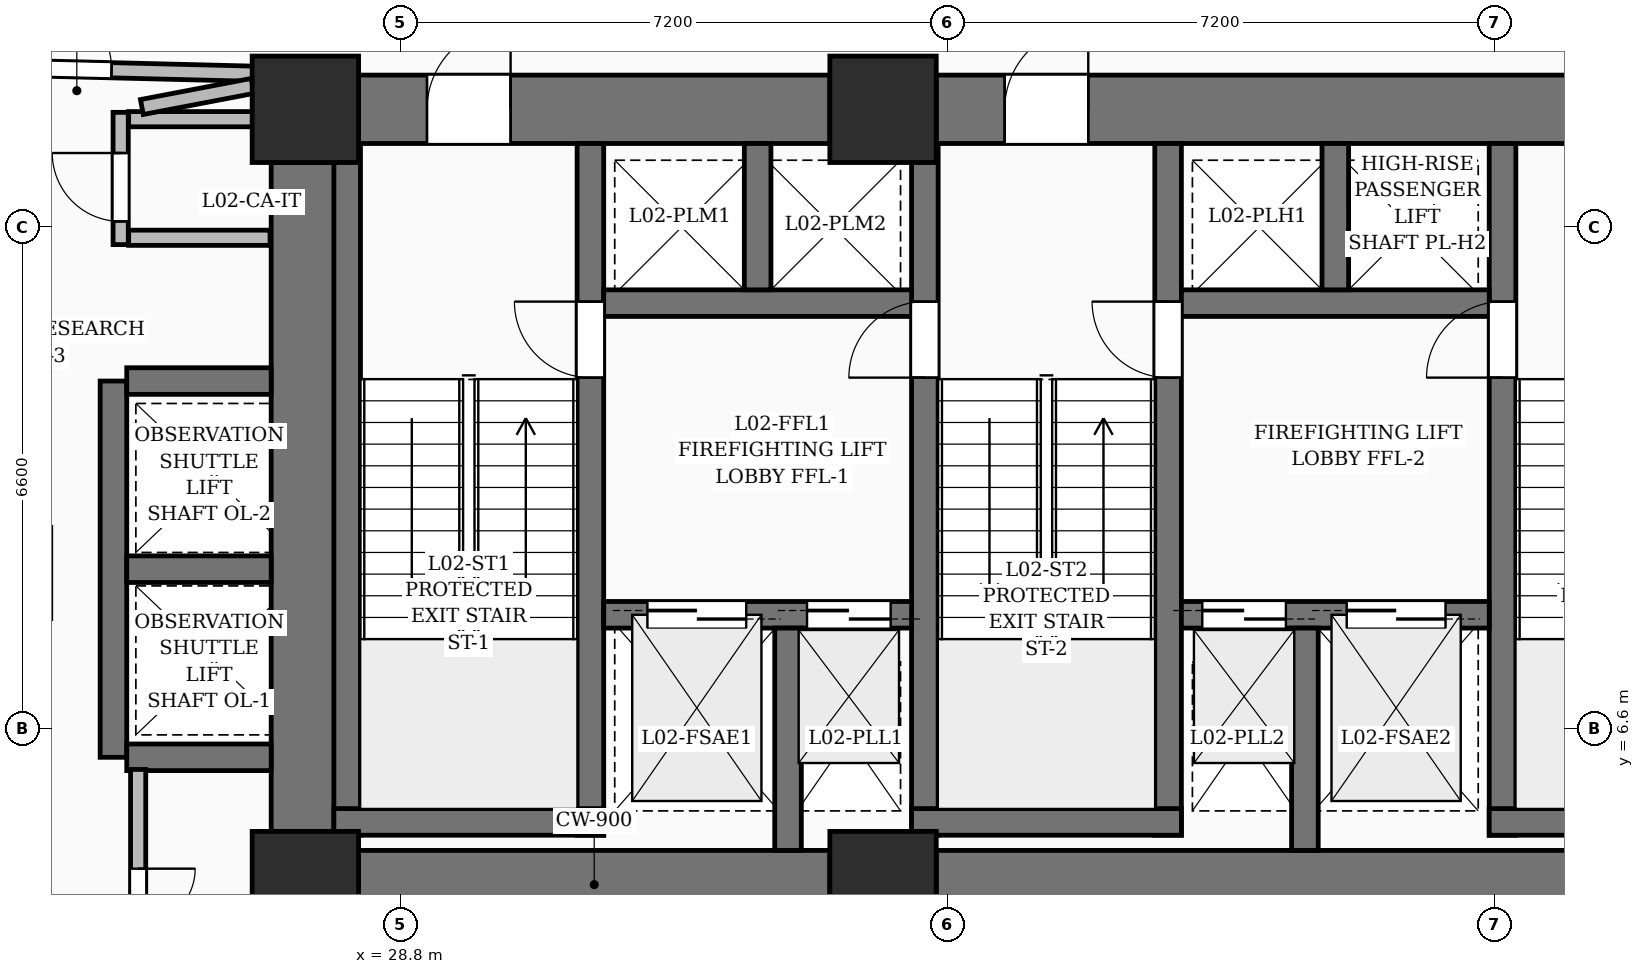
"""IFC4 building model, lengths in metres.
Left out: names, types, materials, properties, quantities, classifications, styles, units other than length and angle.
Written with IfcOpenShell. Run it as: python <this file> out.ifc"""

import sys

from ifc_helpers import new_model, si_unit, direction, frame, frame_2d, origin, origin_2d, place, context, subcontext, project, spatial, rectangle, extrude, element, fill, save


model = new_model("IFC4")
c1 = context("Model", 3, precision=1e-05, world=origin(), true_north=direction((0.0, 1.0)))
c2 = subcontext(c1, "Body", "Model", "MODEL_VIEW")
j1 = project(units=[si_unit("LENGTHUNIT", "METRE"), si_unit("PLANEANGLEUNIT", "RADIAN")], contexts=[c1])
p1 = place(None, origin())
s1 = spatial("IfcSite", under=j1, at=p1, CompositionType="ELEMENT")
p2 = place(p1, origin())
s2 = spatial("IfcBuilding", under=s1, at=p2, CompositionType="ELEMENT")
p3 = place(p2, frame((0.0, 0.0, 12.9)))
s3 = spatial("IfcBuildingStorey", under=s2, at=p3, CompositionType="ELEMENT", Elevation=12.9)
for number, where, z_axis, x_axis in (
    (1, (27.55, 4.55, 0.0), (0.0, 0.0, 1.0), (1.0, 0.0, 0.0)),
    (2, (35.15, 4.55, 0.0), (0.0, 0.0, 1.0), (1.0, 0.0, 0.0)),
    (3, (27.55, 14.75, 0.0), (0.0, 0.0, 1.0), (1.0, 0.0, 0.0)),
    (4, (35.15, 14.75, 0.0), (0.0, 0.0, 1.0), (1.0, 0.0, 0.0)),
):
    element("IfcColumn", number, at=place(p3, frame(where, z_axis=z_axis, x_axis=x_axis)), inside=s3, PredefinedType="COLUMN", context=c2, shape_type="SweptSolid", body=[
        extrude(rectangle(XDim=1.4, YDim=1.4, at=origin_2d()), origin(), (0.0, 0.0, 1.0), 4.5),
    ])
p4 = place(p3, frame((28.25, 4.55, 0.0), z_axis=(0.0, 0.0, 1.0), x_axis=(1.0, 0.0, 0.0)))
e5 = element("IfcWall", 5, at=p4, inside=s3, PredefinedType="SHEAR", context=c2, shape_type="SweptSolid", body=[
    extrude(rectangle(XDim=6.2, YDim=0.9, at=frame_2d((3.1, 0.0))), origin(), (0.0, 0.0, 1.0), 4.5),
])
p5 = place(p3, frame((35.85, 4.55, 0.0), z_axis=(0.0, 0.0, 1.0), x_axis=(1.0, 0.0, 0.0)))
e6 = element("IfcWall", 6, at=p5, inside=s3, PredefinedType="SHEAR", context=c2, shape_type="SweptSolid", body=[
    extrude(rectangle(XDim=10.5, YDim=0.9, at=frame_2d((5.25, 0.0))), origin(), (0.0, 0.0, 1.0), 4.5),
])
p6 = place(p3, frame((28.25, 14.75, 0.0), z_axis=(0.0, 0.0, 1.0), x_axis=(1.0, 0.0, 0.0)))
e7 = element("IfcWall", 7, at=p6, inside=s3, PredefinedType="SHEAR", context=c2, shape_type="SweptSolid", body=[
    extrude(rectangle(XDim=6.2, YDim=0.9, at=frame_2d((3.1, 0.0))), origin(), (0.0, 0.0, 1.0), 4.5),
])
p7 = place(p6, frame((0.9, 0.0, 0.0)))
e8 = element("IfcOpeningElement", 8, at=p7, cuts=e7, PredefinedType="OPENING", context=c2, shape_type="SweptSolid", body=[
    extrude(rectangle(XDim=1.1, YDim=2.2, at=frame_2d((0.55, 1.1))), frame((0.0, 0.46, 0.0), z_axis=(0.0, -1.0, 0.0), x_axis=(1.0, 0.0, 0.0)), (0.0, 0.0, 1.0), 0.92),
])
p8 = place(p3, frame((35.85, 14.75, 0.0), z_axis=(0.0, 0.0, 1.0), x_axis=(1.0, 0.0, 0.0)))
e9 = element("IfcWall", 9, at=p8, inside=s3, PredefinedType="SHEAR", context=c2, shape_type="SweptSolid", body=[
    extrude(rectangle(XDim=10.5, YDim=0.9, at=frame_2d((5.25, 0.0))), origin(), (0.0, 0.0, 1.0), 4.5),
])
p9 = place(p8, frame((0.9, 0.0, 0.0)))
e10 = element("IfcOpeningElement", 10, at=p9, cuts=e9, PredefinedType="OPENING", context=c2, shape_type="SweptSolid", body=[
    extrude(rectangle(XDim=1.1, YDim=2.2, at=frame_2d((0.55, 1.1))), frame((0.0, 0.46, 0.0), z_axis=(0.0, -1.0, 0.0), x_axis=(1.0, 0.0, 0.0)), (0.0, 0.0, 1.0), 0.92),
])
p10 = place(p8, frame((8.5, 0.0, 0.0)))
e11 = element("IfcOpeningElement", 11, at=p10, cuts=e9, PredefinedType="OPENING", context=c2, shape_type="SweptSolid", body=[
    extrude(rectangle(XDim=1.1, YDim=2.2, at=frame_2d((0.55, 1.1))), frame((0.0, 0.46, 0.0), z_axis=(0.0, -1.0, 0.0), x_axis=(1.0, 0.0, 0.0)), (0.0, 0.0, 1.0), 0.92),
])
p11 = place(p3, frame((27.55, 5.25, 0.0), z_axis=(0.0, 0.0, 1.0), x_axis=(0.0, 1.0, 0.0)))
e12 = element("IfcWall", 12, at=p11, inside=s3, PredefinedType="SHEAR", context=c2, shape_type="SweptSolid", body=[
    extrude(rectangle(XDim=8.8, YDim=0.9, at=frame_2d((4.4, 0.0))), origin(), (0.0, 0.0, 1.0), 4.5),
])
p12 = place(p3, frame((28.1, 5.2, 0.0), z_axis=(0.0, 0.0, 1.0), x_axis=(0.0, 1.0, 0.0)))
e13 = element("IfcWall", 13, at=p12, inside=s3, PredefinedType="SOLIDWALL", context=c2, shape_type="SweptSolid", body=[
    extrude(rectangle(XDim=9.1, YDim=0.35, at=frame_2d((4.55, 0.0))), origin(), (0.0, 0.0, 1.0), 4.5),
])
p13 = place(p3, frame((31.3, 5.2, 0.0), z_axis=(0.0, 0.0, 1.0), x_axis=(0.0, 1.0, 0.0)))
e14 = element("IfcWall", 14, at=p13, inside=s3, PredefinedType="SOLIDWALL", context=c2, shape_type="SweptSolid", body=[
    extrude(rectangle(XDim=9.1, YDim=0.35, at=frame_2d((4.55, 0.0))), origin(), (0.0, 0.0, 1.0), 4.5),
])
p14 = place(p13, frame((6.02, 0.0, 0.0)))
e15 = element("IfcOpeningElement", 15, at=p14, cuts=e14, PredefinedType="OPENING", context=c2, shape_type="SweptSolid", body=[
    extrude(rectangle(XDim=1.0, YDim=2.15, at=frame_2d((0.5, 1.075))), frame((0.0, 0.185, 0.0), z_axis=(0.0, -1.0, 0.0), x_axis=(1.0, 0.0, 0.0)), (0.0, 0.0, 1.0), 0.37),
])
p15 = place(p3, frame((27.925, 5.375, 0.0), z_axis=(0.0, 0.0, 1.0), x_axis=(1.0, 0.0, 0.0)))
e16 = element("IfcWall", 16, at=p15, inside=s3, PredefinedType="SOLIDWALL", context=c2, shape_type="SweptSolid", body=[
    extrude(rectangle(XDim=3.55, YDim=0.35, at=frame_2d((1.775, 0.0))), origin(), (0.0, 0.0, 1.0), 4.5),
])
p16 = place(p3, frame((35.7, 5.2, 0.0), z_axis=(0.0, 0.0, 1.0), x_axis=(0.0, 1.0, 0.0)))
e17 = element("IfcWall", 17, at=p16, inside=s3, PredefinedType="SOLIDWALL", context=c2, shape_type="SweptSolid", body=[
    extrude(rectangle(XDim=9.1, YDim=0.35, at=frame_2d((4.55, 0.0))), origin(), (0.0, 0.0, 1.0), 4.5),
])
p17 = place(p16, frame((6.02, 0.0, 0.0)))
e18 = element("IfcOpeningElement", 18, at=p17, cuts=e17, PredefinedType="OPENING", context=c2, shape_type="SweptSolid", body=[
    extrude(rectangle(XDim=1.0, YDim=2.15, at=frame_2d((0.5, 1.075))), frame((0.0, 0.185, 0.0), z_axis=(0.0, -1.0, 0.0), x_axis=(1.0, 0.0, 0.0)), (0.0, 0.0, 1.0), 0.37),
])
p18 = place(p3, frame((38.9, 5.2, 0.0), z_axis=(0.0, 0.0, 1.0), x_axis=(0.0, 1.0, 0.0)))
e19 = element("IfcWall", 19, at=p18, inside=s3, PredefinedType="SOLIDWALL", context=c2, shape_type="SweptSolid", body=[
    extrude(rectangle(XDim=9.1, YDim=0.35, at=frame_2d((4.55, 0.0))), origin(), (0.0, 0.0, 1.0), 4.5),
])
p19 = place(p18, frame((6.02, 0.0, 0.0)))
e20 = element("IfcOpeningElement", 20, at=p19, cuts=e19, PredefinedType="OPENING", context=c2, shape_type="SweptSolid", body=[
    extrude(rectangle(XDim=1.0, YDim=2.15, at=frame_2d((0.5, 1.075))), frame((0.0, 0.185, 0.0), z_axis=(0.0, -1.0, 0.0), x_axis=(1.0, 0.0, 0.0)), (0.0, 0.0, 1.0), 0.37),
])
p20 = place(p3, frame((35.525, 5.375, 0.0), z_axis=(0.0, 0.0, 1.0), x_axis=(1.0, 0.0, 0.0)))
e21 = element("IfcWall", 21, at=p20, inside=s3, PredefinedType="SOLIDWALL", context=c2, shape_type="SweptSolid", body=[
    extrude(rectangle(XDim=3.55, YDim=0.35, at=frame_2d((1.775, 0.0))), origin(), (0.0, 0.0, 1.0), 4.5),
])
p21 = place(p3, frame((43.3, 5.2, 0.0), z_axis=(0.0, 0.0, 1.0), x_axis=(0.0, 1.0, 0.0)))
e22 = element("IfcWall", 22, at=p21, inside=s3, PredefinedType="SOLIDWALL", context=c2, shape_type="SweptSolid", body=[
    extrude(rectangle(XDim=9.1, YDim=0.35, at=frame_2d((4.55, 0.0))), origin(), (0.0, 0.0, 1.0), 4.5),
])
p22 = place(p21, frame((6.02, 0.0, 0.0)))
e23 = element("IfcOpeningElement", 23, at=p22, cuts=e22, PredefinedType="OPENING", context=c2, shape_type="SweptSolid", body=[
    extrude(rectangle(XDim=1.0, YDim=2.15, at=frame_2d((0.5, 1.075))), frame((0.0, 0.185, 0.0), z_axis=(0.0, -1.0, 0.0), x_axis=(1.0, 0.0, 0.0)), (0.0, 0.0, 1.0), 0.37),
])
p23 = place(p3, frame((43.125, 5.375, 0.0), z_axis=(0.0, 0.0, 1.0), x_axis=(1.0, 0.0, 0.0)))
e24 = element("IfcWall", 24, at=p23, inside=s3, PredefinedType="SOLIDWALL", context=c2, shape_type="SweptSolid", body=[
    extrude(rectangle(XDim=3.55, YDim=0.35, at=frame_2d((1.775, 0.0))), origin(), (0.0, 0.0, 1.0), 4.5),
])
p24 = place(p3, frame((31.475, 8.1, 0.0), z_axis=(0.0, 0.0, 1.0), x_axis=(1.0, 0.0, 0.0)))
e25 = element("IfcWall", 25, at=p24, inside=s3, PredefinedType="SOLIDWALL", context=c2, shape_type="SweptSolid", body=[
    extrude(rectangle(XDim=4.05, YDim=0.35, at=frame_2d((2.025, 0.0))), origin(), (0.0, 0.0, 1.0), 4.5),
])
p25 = place(p24, frame((0.575, 0.0, 0.0)))
e26 = element("IfcOpeningElement", 26, at=p25, cuts=e25, PredefinedType="OPENING", context=c2, shape_type="SweptSolid", body=[
    extrude(rectangle(XDim=1.3, YDim=2.25, at=frame_2d((0.65, 1.125))), frame((0.0, 0.185, 0.0), z_axis=(0.0, -1.0, 0.0), x_axis=(1.0, 0.0, 0.0)), (0.0, 0.0, 1.0), 0.37),
])
p26 = place(p24, frame((2.675, 0.0, 0.0)))
e27 = element("IfcOpeningElement", 27, at=p26, cuts=e25, PredefinedType="OPENING", context=c2, shape_type="SweptSolid", body=[
    extrude(rectangle(XDim=1.1, YDim=2.2, at=frame_2d((0.55, 1.1))), frame((0.0, 0.185, 0.0), z_axis=(0.0, -1.0, 0.0), x_axis=(1.0, 0.0, 0.0)), (0.0, 0.0, 1.0), 0.37),
])
p27 = place(p3, frame((39.075, 8.1, 0.0), z_axis=(0.0, 0.0, 1.0), x_axis=(1.0, 0.0, 0.0)))
e28 = element("IfcWall", 28, at=p27, inside=s3, PredefinedType="SOLIDWALL", context=c2, shape_type="SweptSolid", body=[
    extrude(rectangle(XDim=4.05, YDim=0.35, at=frame_2d((2.025, 0.0))), origin(), (0.0, 0.0, 1.0), 4.5),
])
p28 = place(p27, frame((2.175, 0.0, 0.0)))
e29 = element("IfcOpeningElement", 29, at=p28, cuts=e28, PredefinedType="OPENING", context=c2, shape_type="SweptSolid", body=[
    extrude(rectangle(XDim=1.3, YDim=2.25, at=frame_2d((0.65, 1.125))), frame((0.0, 0.185, 0.0), z_axis=(0.0, -1.0, 0.0), x_axis=(1.0, 0.0, 0.0)), (0.0, 0.0, 1.0), 0.37),
])
p29 = place(p27, frame((0.275, 0.0, 0.0)))
e30 = element("IfcOpeningElement", 30, at=p29, cuts=e28, PredefinedType="OPENING", context=c2, shape_type="SweptSolid", body=[
    extrude(rectangle(XDim=1.1, YDim=2.2, at=frame_2d((0.55, 1.1))), frame((0.0, 0.185, 0.0), z_axis=(0.0, -1.0, 0.0), x_axis=(1.0, 0.0, 0.0)), (0.0, 0.0, 1.0), 0.37),
])
for number, where, z_axis, x_axis in (
    (31, (33.9, 5.0, 0.0), (0.0, 0.0, 1.0), (0.0, 1.0, 0.0)),
    (32, (40.7, 5.0, 0.0), (0.0, 0.0, 1.0), (0.0, 1.0, 0.0)),
):
    element("IfcWall", number, at=place(p3, frame(where, z_axis=z_axis, x_axis=x_axis)), inside=s3, PredefinedType="SOLIDWALL", context=c2, shape_type="SweptSolid", body=[
        extrude(rectangle(XDim=2.925, YDim=0.35, at=frame_2d((1.462, 0.0))), origin(), (0.0, 0.0, 1.0), 4.5),
    ])
p30 = place(p3, frame((31.475, 12.2, 0.0), z_axis=(0.0, 0.0, 1.0), x_axis=(1.0, 0.0, 0.0)))
e33 = element("IfcWall", 33, at=p30, inside=s3, PredefinedType="SOLIDWALL", context=c2, shape_type="SweptSolid", body=[
    extrude(rectangle(XDim=4.05, YDim=0.35, at=frame_2d((2.025, 0.0))), origin(), (0.0, 0.0, 1.0), 4.5),
])
p31 = place(p3, frame((33.5, 12.375, 0.0), z_axis=(0.0, 0.0, 1.0), x_axis=(0.0, 1.0, 0.0)))
e34 = element("IfcWall", 34, at=p31, inside=s3, PredefinedType="SOLIDWALL", context=c2, shape_type="SweptSolid", body=[
    extrude(rectangle(XDim=1.925, YDim=0.35, at=frame_2d((0.962, 0.0))), origin(), (0.0, 0.0, 1.0), 4.5),
])
p32 = place(p3, frame((39.075, 12.2, 0.0), z_axis=(0.0, 0.0, 1.0), x_axis=(1.0, 0.0, 0.0)))
e35 = element("IfcWall", 35, at=p32, inside=s3, PredefinedType="SOLIDWALL", context=c2, shape_type="SweptSolid", body=[
    extrude(rectangle(XDim=4.05, YDim=0.35, at=frame_2d((2.025, 0.0))), origin(), (0.0, 0.0, 1.0), 4.5),
])
p33 = place(p3, frame((41.1, 12.375, 0.0), z_axis=(0.0, 0.0, 1.0), x_axis=(0.0, 1.0, 0.0)))
e36 = element("IfcWall", 36, at=p33, inside=s3, PredefinedType="SOLIDWALL", context=c2, shape_type="SweptSolid", body=[
    extrude(rectangle(XDim=1.925, YDim=0.35, at=frame_2d((0.962, 0.0))), origin(), (0.0, 0.0, 1.0), 4.5),
])
p34 = place(p3, frame((25.025, 6.225, 0.0), z_axis=(0.0, 0.0, 1.0), x_axis=(0.0, 1.0, 0.0)))
e37 = element("IfcWall", 37, at=p34, inside=s3, PredefinedType="SOLIDWALL", context=c2, shape_type="SweptSolid", body=[
    extrude(rectangle(XDim=4.95, YDim=0.35, at=frame_2d((2.475, 0.0))), origin(), (0.0, 0.0, 1.0), 4.5),
])
for number, where, z_axis, x_axis in (
    (38, (25.2, 6.225, 0.0), (0.0, 0.0, 1.0), (1.0, 0.0, 0.0)),
    (39, (25.2, 8.7, 0.0), (0.0, 0.0, 1.0), (1.0, 0.0, 0.0)),
    (40, (25.2, 11.175, 0.0), (0.0, 0.0, 1.0), (1.0, 0.0, 0.0)),
):
    element("IfcWall", number, at=place(p3, frame(where, z_axis=z_axis, x_axis=x_axis)), inside=s3, PredefinedType="SOLIDWALL", context=c2, shape_type="SweptSolid", body=[
        extrude(rectangle(XDim=1.9, YDim=0.35, at=frame_2d((0.95, 0.0))), origin(), (0.0, 0.0, 1.0), 4.5),
    ])
p35 = place(p3, frame((25.12, 12.97, 0.0), z_axis=(0.0, 0.0, 1.0), x_axis=(0.0, 1.0, 0.0)))
e41 = element("IfcWall", 41, at=p35, inside=s3, PredefinedType="PARTITIONING", context=c2, shape_type="SweptSolid", body=[
    extrude(rectangle(XDim=1.74, YDim=0.2, at=frame_2d((0.87, 0.0))), origin(), (0.0, 0.0, 1.0), 4.2),
])
p36 = place(p35, frame((0.305, 0.0, 0.0)))
e42 = element("IfcOpeningElement", 42, at=p36, cuts=e41, PredefinedType="OPENING", context=c2, shape_type="SweptSolid", body=[
    extrude(rectangle(XDim=0.9, YDim=2.1, at=frame_2d((0.45, 1.05))), frame((0.0, 0.11, 0.0), z_axis=(0.0, -1.0, 0.0), x_axis=(1.0, 0.0, 0.0)), (0.0, 0.0, 1.0), 0.22),
])
for number, where, z_axis, x_axis in (
    (43, (25.225, 14.62, 0.0), (0.0, 0.0, 1.0), (1.0, 0.0, 0.0)),
    (44, (25.225, 13.06, 0.0), (0.0, 0.0, 1.0), (1.0, 0.0, 0.0)),
):
    element("IfcWall", number, at=place(p3, frame(where, z_axis=z_axis, x_axis=x_axis)), inside=s3, PredefinedType="PARTITIONING", context=c2, shape_type="SweptSolid", body=[
        extrude(rectangle(XDim=1.86, YDim=0.2, at=frame_2d((0.93, 0.0))), origin(), (0.0, 0.0, 1.0), 4.2),
    ])
p37 = place(p3, frame((21.5, 15.35, 0.0), z_axis=(0.0, 0.0, 1.0), x_axis=(0.999697218396, -0.024606331118, 0.0)))
e45 = element("IfcWall", 45, at=p37, inside=s3, PredefinedType="PARTITIONING", context=c2, shape_type="SweptSolid", body=[
    extrude(rectangle(XDim=6.102, YDim=0.2, at=frame_2d((3.051, 0.0))), origin(), (0.0, 0.0, 1.0), 3.078),
])
p38 = place(p37, frame((2.601, 0.0, 0.0)))
e46 = element("IfcOpeningElement", 46, at=p38, cuts=e45, PredefinedType="OPENING", context=c2, shape_type="SweptSolid", body=[
    extrude(rectangle(XDim=0.9, YDim=2.1, at=frame_2d((0.45, 1.05))), frame((0.0, 0.11, 0.0), z_axis=(0.0, -1.0, 0.0), x_axis=(1.0, 0.0, 0.0)), (0.0, 0.0, 1.0), 0.22),
])
p39 = place(p3, frame((25.35, 6.065, 0.0), z_axis=(0.0, 0.0, 1.0), x_axis=(0.0, -1.0, 0.0)))
e47 = element("IfcWall", 47, at=p39, inside=s3, PredefinedType="PARTITIONING", context=c2, shape_type="SweptSolid", body=[
    extrude(rectangle(XDim=4.165, YDim=0.2, at=frame_2d((2.083, 0.0))), origin(), (0.0, 0.0, 1.0), 2.97),
])
p40 = place(p39, frame((1.305, 0.0, 0.0)))
e48 = element("IfcOpeningElement", 48, at=p40, cuts=e47, PredefinedType="OPENING", context=c2, shape_type="SweptSolid", body=[
    extrude(rectangle(XDim=1.5, YDim=2.2, at=frame_2d((0.75, 1.1))), frame((0.0, 0.11, 0.0), z_axis=(0.0, -1.0, 0.0), x_axis=(1.0, 0.0, 0.0)), (0.0, 0.0, 1.0), 0.22),
])
p41 = place(p3, frame((25.399, 14.78, 0.0), z_axis=(0.0, 0.0, 1.0), x_axis=(0.982293908453, 0.187346410202, 0.0)))
e49 = element("IfcWall", 49, at=p41, inside=s3, PredefinedType="PARTITIONING", context=c2, shape_type="SweptSolid", body=[
    extrude(rectangle(XDim=1.484, YDim=0.2, at=frame_2d((0.742, 0.0))), origin(), (0.0, 0.0, 1.0), 3.078),
])
p42 = place(p7, origin())
e50 = element("IfcDoor", 50, at=p42, inside=s3, OperationType="SINGLE_SWING_RIGHT", PredefinedType="DOOR", context=c2, shape_type="SweptSolid", body=[
    extrude(rectangle(XDim=1.1, YDim=2.2, at=frame_2d((0.55, 1.1))), frame((0.0, 0.025, 0.0), z_axis=(0.0, -1.0, 0.0), x_axis=(1.0, 0.0, 0.0)), (0.0, 0.0, 1.0), 0.05),
])
fill(e8, e50)
p43 = place(p9, origin())
e51 = element("IfcDoor", 51, at=p43, inside=s3, OperationType="SINGLE_SWING_RIGHT", PredefinedType="DOOR", context=c2, shape_type="SweptSolid", body=[
    extrude(rectangle(XDim=1.1, YDim=2.2, at=frame_2d((0.55, 1.1))), frame((0.0, 0.025, 0.0), z_axis=(0.0, -1.0, 0.0), x_axis=(1.0, 0.0, 0.0)), (0.0, 0.0, 1.0), 0.05),
])
fill(e10, e51)
p44 = place(p14, origin())
e52 = element("IfcDoor", 52, at=p44, inside=s3, OperationType="SINGLE_SWING_RIGHT", PredefinedType="DOOR", context=c2, shape_type="SweptSolid", body=[
    extrude(rectangle(XDim=1.0, YDim=2.15, at=frame_2d((0.5, 1.075))), frame((0.0, 0.025, 0.0), z_axis=(0.0, -1.0, 0.0), x_axis=(1.0, 0.0, 0.0)), (0.0, 0.0, 1.0), 0.05),
])
fill(e15, e52)
p45 = place(p17, origin())
e53 = element("IfcDoor", 53, at=p45, inside=s3, OperationType="SINGLE_SWING_LEFT", PredefinedType="DOOR", context=c2, shape_type="SweptSolid", body=[
    extrude(rectangle(XDim=1.0, YDim=2.15, at=frame_2d((0.5, 1.075))), frame((0.0, 0.025, 0.0), z_axis=(0.0, -1.0, 0.0), x_axis=(1.0, 0.0, 0.0)), (0.0, 0.0, 1.0), 0.05),
])
fill(e18, e53)
p46 = place(p19, origin())
e54 = element("IfcDoor", 54, at=p46, inside=s3, OperationType="SINGLE_SWING_RIGHT", PredefinedType="DOOR", context=c2, shape_type="SweptSolid", body=[
    extrude(rectangle(XDim=1.0, YDim=2.15, at=frame_2d((0.5, 1.075))), frame((0.0, 0.025, 0.0), z_axis=(0.0, -1.0, 0.0), x_axis=(1.0, 0.0, 0.0)), (0.0, 0.0, 1.0), 0.05),
])
fill(e20, e54)
p47 = place(p22, origin())
e55 = element("IfcDoor", 55, at=p47, inside=s3, OperationType="SINGLE_SWING_LEFT", PredefinedType="DOOR", context=c2, shape_type="SweptSolid", body=[
    extrude(rectangle(XDim=1.0, YDim=2.15, at=frame_2d((0.5, 1.075))), frame((0.0, 0.025, 0.0), z_axis=(0.0, -1.0, 0.0), x_axis=(1.0, 0.0, 0.0)), (0.0, 0.0, 1.0), 0.05),
])
fill(e23, e55)
p48 = place(p25, origin())
e56 = element("IfcDoor", 56, at=p48, inside=s3, OperationType="DOUBLE_DOOR_SLIDING", PredefinedType="DOOR", context=c2, shape_type="SweptSolid", body=[
    extrude(rectangle(XDim=1.3, YDim=2.25, at=frame_2d((0.65, 1.125))), frame((0.0, 0.025, 0.0), z_axis=(0.0, -1.0, 0.0), x_axis=(1.0, 0.0, 0.0)), (0.0, 0.0, 1.0), 0.05),
])
fill(e26, e56)
p49 = place(p28, origin())
e57 = element("IfcDoor", 57, at=p49, inside=s3, OperationType="DOUBLE_DOOR_SLIDING", PredefinedType="DOOR", context=c2, shape_type="SweptSolid", body=[
    extrude(rectangle(XDim=1.3, YDim=2.25, at=frame_2d((0.65, 1.125))), frame((0.0, 0.025, 0.0), z_axis=(0.0, -1.0, 0.0), x_axis=(1.0, 0.0, 0.0)), (0.0, 0.0, 1.0), 0.05),
])
fill(e29, e57)
p50 = place(p26, origin())
e58 = element("IfcDoor", 58, at=p50, inside=s3, OperationType="DOUBLE_DOOR_SLIDING", PredefinedType="DOOR", context=c2, shape_type="SweptSolid", body=[
    extrude(rectangle(XDim=1.1, YDim=2.2, at=frame_2d((0.55, 1.1))), frame((0.0, 0.025, 0.0), z_axis=(0.0, -1.0, 0.0), x_axis=(1.0, 0.0, 0.0)), (0.0, 0.0, 1.0), 0.05),
])
fill(e27, e58)
p51 = place(p29, origin())
e59 = element("IfcDoor", 59, at=p51, inside=s3, OperationType="DOUBLE_DOOR_SLIDING", PredefinedType="DOOR", context=c2, shape_type="SweptSolid", body=[
    extrude(rectangle(XDim=1.1, YDim=2.2, at=frame_2d((0.55, 1.1))), frame((0.0, 0.025, 0.0), z_axis=(0.0, -1.0, 0.0), x_axis=(1.0, 0.0, 0.0)), (0.0, 0.0, 1.0), 0.05),
])
fill(e30, e59)
p52 = place(p36, origin())
e60 = element("IfcDoor", 60, at=p52, inside=s3, OperationType="SINGLE_SWING_RIGHT", PredefinedType="DOOR", context=c2, shape_type="SweptSolid", body=[
    extrude(rectangle(XDim=0.9, YDim=2.1, at=frame_2d((0.45, 1.05))), frame((0.0, 0.025, 0.0), z_axis=(0.0, -1.0, 0.0), x_axis=(1.0, 0.0, 0.0)), (0.0, 0.0, 1.0), 0.05),
])
fill(e42, e60)
p53 = place(p38, origin())
e61 = element("IfcDoor", 61, at=p53, inside=s3, OperationType="SINGLE_SWING_LEFT", PredefinedType="DOOR", context=c2, shape_type="SweptSolid", body=[
    extrude(rectangle(XDim=0.9, YDim=2.1, at=frame_2d((0.45, 1.05))), frame((0.0, 0.025, 0.0), z_axis=(0.0, -1.0, 0.0), x_axis=(1.0, 0.0, 0.0)), (0.0, 0.0, 1.0), 0.05),
])
fill(e46, e61)
p54 = place(p40, origin())
e62 = element("IfcDoor", 62, at=p54, inside=s3, OperationType="DOUBLE_DOOR_SINGLE_SWING", PredefinedType="DOOR", context=c2, shape_type="SweptSolid", body=[
    extrude(rectangle(XDim=1.5, YDim=2.2, at=frame_2d((0.75, 1.1))), frame((0.0, 0.025, 0.0), z_axis=(0.0, -1.0, 0.0), x_axis=(1.0, 0.0, 0.0)), (0.0, 0.0, 1.0), 0.05),
])
fill(e48, e62)
save(model, sys.argv[1])
